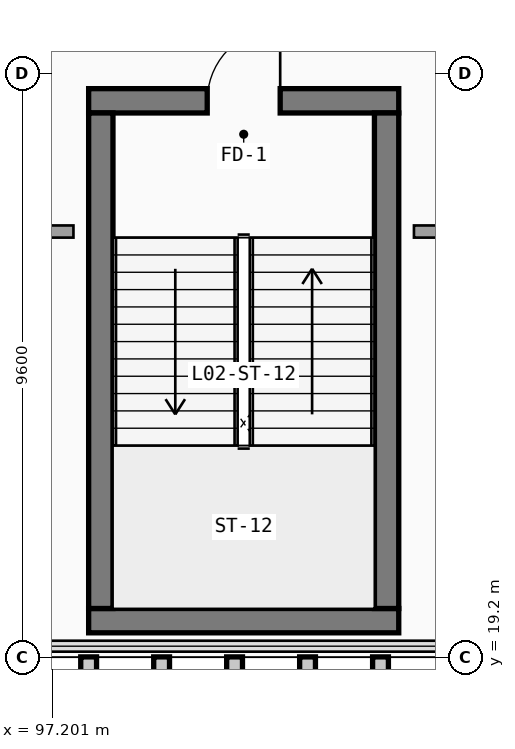
"""IFC4 building model, lengths in metres.
Left out: names, types, materials, properties, quantities, classifications, styles, units other than length and angle.
Written with IfcOpenShell. Run it as: python <this file> out.ifc"""

import sys

from ifc_helpers import new_model, si_unit, direction, frame, frame_2d, origin, place, context, subcontext, project, spatial, rectangle, extrude, element, fill, save


model = new_model("IFC4")
c1 = context("Model", 3, precision=1e-05, world=origin(), true_north=direction((0.0, 1.0)))
c2 = subcontext(c1, "Body", "Model", "MODEL_VIEW")
j1 = project(units=[si_unit("LENGTHUNIT", "METRE"), si_unit("PLANEANGLEUNIT", "RADIAN")], contexts=[c1])
p1 = place(None, origin())
s1 = spatial("IfcSite", under=j1, at=p1, CompositionType="ELEMENT")
p2 = place(p1, origin())
s2 = spatial("IfcBuilding", under=s1, at=p2, CompositionType="ELEMENT")
p3 = place(p2, frame((0.0, 0.0, 9.6)))
s3 = spatial("IfcBuildingStorey", under=s2, at=p3, CompositionType="ELEMENT", Elevation=9.6)
p4 = place(p3, frame((97.8, 19.8, 0.0), z_axis=(0.0, 0.0, 1.0), x_axis=(1.0, 0.0, 0.0)))
e1 = element("IfcWall", 1, at=p4, inside=s3, PredefinedType="SHEAR", context=c2, shape_type="SweptSolid", body=[
    extrude(rectangle(XDim=5.1, YDim=0.4, at=frame_2d((2.55, 0.0))), origin(), (0.0, 0.0, 1.0), 4.22),
])
p5 = place(p3, frame((102.9, 28.35, 0.0), z_axis=(0.0, 0.0, 1.0), x_axis=(-1.0, 0.0, 0.0)))
e2 = element("IfcWall", 2, at=p5, inside=s3, PredefinedType="SHEAR", context=c2, shape_type="SweptSolid", body=[
    extrude(rectangle(XDim=5.1, YDim=0.4, at=frame_2d((2.55, 0.0))), origin(), (0.0, 0.0, 1.0), 4.22),
])
p6 = place(p5, frame((3.15, 0.0, 0.0), z_axis=(0.0, 0.0, 1.0), x_axis=(-1.0, 0.0, 0.0)))
e3 = element("IfcOpeningElement", 3, at=p6, cuts=e2, PredefinedType="OPENING", context=c2, shape_type="SweptSolid", body=[
    extrude(rectangle(XDim=1.2, YDim=2.2, at=frame_2d((0.6, 1.1))), frame((0.0, 0.21, 0.0), z_axis=(0.0, -1.0, 0.0), x_axis=(1.0, 0.0, 0.0)), (0.0, 0.0, 1.0), 0.42),
])
for number, where, z_axis, x_axis in (
    (4, (98.0, 28.15, 0.0), (0.0, 0.0, 1.0), (0.0, -1.0, 0.0)),
    (5, (102.7, 20.0, 0.0), (0.0, 0.0, 1.0), (0.0, 1.0, 0.0)),
):
    element("IfcWall", number, at=place(p3, frame(where, z_axis=z_axis, x_axis=x_axis)), inside=s3, PredefinedType="SHEAR", context=c2, shape_type="SweptSolid", body=[
        extrude(rectangle(XDim=8.15, YDim=0.4, at=frame_2d((4.075, 0.0))), origin(), (0.0, 0.0, 1.0), 4.22),
    ])
p7 = place(p3, frame((106.82, 26.2, 0.0), z_axis=(0.0, 0.0, 1.0), x_axis=(-1.0, 0.0, 0.0)))
e6 = element("IfcWall", 6, at=p7, inside=s3, PredefinedType="PARTITIONING", context=c2, shape_type="SweptSolid", body=[
    extrude(rectangle(XDim=3.67, YDim=0.2, at=frame_2d((1.835, 0.0))), origin(), (0.0, 0.0, 1.0), 3.613),
])
p8 = place(p3, frame((97.55, 26.2, 0.0), z_axis=(0.0, 0.0, 1.0), x_axis=(-1.0, 0.0, 0.0)))
e7 = element("IfcWall", 7, at=p8, inside=s3, PredefinedType="PARTITIONING", context=c2, shape_type="SweptSolid", body=[
    extrude(rectangle(XDim=5.17, YDim=0.2, at=frame_2d((2.585, 0.0))), origin(), (0.0, 0.0, 1.0), 3.613),
])
p9 = place(p8, frame((1.835, 0.0, 0.0), z_axis=(0.0, 0.0, 1.0), x_axis=(1.0, 0.0, 0.0)))
e8 = element("IfcOpeningElement", 8, at=p9, cuts=e7, PredefinedType="OPENING", context=c2, shape_type="SweptSolid", body=[
    extrude(rectangle(XDim=1.5, YDim=2.25, at=frame_2d((0.75, 1.125))), frame((0.0, 0.11, 0.0), z_axis=(0.0, -1.0, 0.0), x_axis=(1.0, 0.0, 0.0)), (0.0, 0.0, 1.0), 0.22),
])
p10 = place(p6, origin())
e9 = element("IfcDoor", 9, at=p10, inside=s3, OperationType="SINGLE_SWING_RIGHT", PredefinedType="DOOR", context=c2, shape_type="SweptSolid", body=[
    extrude(rectangle(XDim=1.2, YDim=2.2, at=frame_2d((0.6, 1.1))), frame((0.0, 0.025, 0.0), z_axis=(0.0, -1.0, 0.0), x_axis=(1.0, 0.0, 0.0)), (0.0, 0.0, 1.0), 0.05),
])
fill(e3, e9)
save(model, sys.argv[1])
